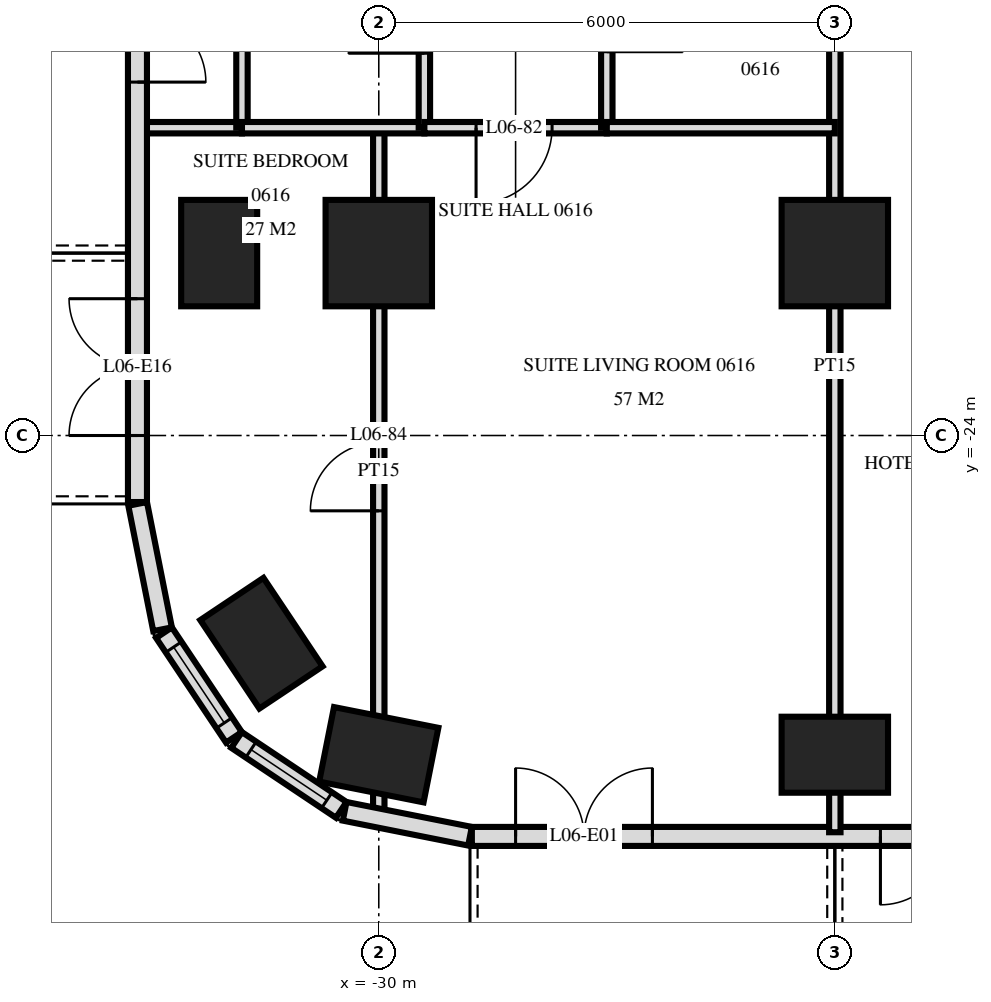
"""IFC4 building model, lengths in metres.
Left out: names, types, materials, properties, quantities, classifications, styles, units other than length and angle.
Written with IfcOpenShell. Run it as: python <this file> out.ifc"""

import sys

from ifc_helpers import new_model, si_unit, direction, frame, frame_2d, origin, origin_2d, place, context, subcontext, project, spatial, rectangle, extrude, element, fill, save


model = new_model("IFC4")
c1 = context("Model", 3, precision=1e-05, world=origin(), true_north=direction((0.0, 1.0)))
c2 = subcontext(c1, "Body", "Model", "MODEL_VIEW")
j1 = project(units=[si_unit("LENGTHUNIT", "METRE"), si_unit("PLANEANGLEUNIT", "RADIAN")], contexts=[c1])
p1 = place(None, origin())
s1 = spatial("IfcSite", under=j1, at=p1, CompositionType="ELEMENT")
p2 = place(p1, origin())
s2 = spatial("IfcBuilding", under=s1, at=p2, CompositionType="ELEMENT")
p3 = place(p2, frame((0.0, 0.0, 31.2)))
s3 = spatial("IfcBuildingStorey", under=s2, at=p3, CompositionType="ELEMENT", Elevation=31.2)
for number, where, z_axis, x_axis in (
    (1, (-32.1, -21.6, 0.0), (0.0, 0.0, 1.0), (0.0, 1.0, 0.0)),
    (2, (-31.544, -26.733, 0.0), (0.0, 0.0, 1.0), (-0.556, 0.831, 0.0)),
    (3, (-30.0, -28.2, 0.0), (0.0, 0.0, 1.0), (-0.981, 0.195, 0.0)),
):
    element("IfcColumn", number, at=place(p3, frame(where, z_axis=z_axis, x_axis=x_axis)), inside=s3, PredefinedType="COLUMN", context=c2, shape_type="SweptSolid", body=[
        extrude(rectangle(XDim=1.4, YDim=1.0, at=origin_2d()), origin(), (0.0, 0.0, 1.0), 3.6),
    ])
p4 = place(p3, frame((-30.0, -21.6, 0.0), z_axis=(0.0, 0.0, 1.0), x_axis=(1.0, 0.0, 0.0)))
e4 = element("IfcColumn", 4, at=p4, inside=s3, PredefinedType="COLUMN", context=c2, shape_type="SweptSolid", body=[
    extrude(rectangle(XDim=1.4, YDim=1.4, at=origin_2d()), origin(), (0.0, 0.0, 1.0), 3.6),
])
p5 = place(p3, frame((-24.0, -28.2, 0.0), z_axis=(0.0, 0.0, 1.0), x_axis=(1.0, 0.0, 0.0)))
e5 = element("IfcColumn", 5, at=p5, inside=s3, PredefinedType="COLUMN", context=c2, shape_type="SweptSolid", body=[
    extrude(rectangle(XDim=1.4, YDim=1.0, at=origin_2d()), origin(), (0.0, 0.0, 1.0), 3.6),
])
p6 = place(p3, frame((-24.0, -21.6, 0.0), z_axis=(0.0, 0.0, 1.0), x_axis=(1.0, 0.0, 0.0)))
e6 = element("IfcColumn", 6, at=p6, inside=s3, PredefinedType="COLUMN", context=c2, shape_type="SweptSolid", body=[
    extrude(rectangle(XDim=1.4, YDim=1.4, at=origin_2d()), origin(), (0.0, 0.0, 1.0), 3.6),
])
p7 = place(p3, frame((-33.175, -3.325, 0.0), z_axis=(0.0, 0.0, 1.0), x_axis=(0.0, -1.0, 0.0)))
e7 = element("IfcWall", 7, at=p7, inside=s3, PredefinedType="SOLIDWALL", context=c2, shape_type="SweptSolid", body=[
    extrude(rectangle(XDim=21.551, YDim=0.25, at=frame_2d((10.775, 0.0))), origin(), (0.0, 0.0, 1.0), 3.32),
])
p8 = place(p7, frame((7.025, 0.0, 0.0)))
e8 = element("IfcOpeningElement", 8, at=p8, cuts=e7, PredefinedType="OPENING", context=c2, shape_type="SweptSolid", body=[
    extrude(rectangle(XDim=1.8, YDim=2.4, at=frame_2d((0.9, 1.2))), frame((0.0, 0.135, 0.0), z_axis=(0.0, -1.0, 0.0), x_axis=(1.0, 0.0, 0.0)), (0.0, 0.0, 1.0), 0.27),
])
p9 = place(p7, frame((14.225, 0.0, 0.0)))
e9 = element("IfcOpeningElement", 9, at=p9, cuts=e7, PredefinedType="OPENING", context=c2, shape_type="SweptSolid", body=[
    extrude(rectangle(XDim=1.8, YDim=2.4, at=frame_2d((0.9, 1.2))), frame((0.0, 0.135, 0.0), z_axis=(0.0, -1.0, 0.0), x_axis=(1.0, 0.0, 0.0)), (0.0, 0.0, 1.0), 0.27),
])
p10 = place(p7, frame((18.875, 0.0, 0.0)))
e10 = element("IfcOpeningElement", 10, at=p10, cuts=e7, PredefinedType="OPENING", context=c2, shape_type="SweptSolid", body=[
    extrude(rectangle(XDim=1.8, YDim=2.4, at=frame_2d((0.9, 1.2))), frame((0.0, 0.135, 0.0), z_axis=(0.0, -1.0, 0.0), x_axis=(1.0, 0.0, 0.0)), (0.0, 0.0, 1.0), 0.27),
])
p11 = place(p3, frame((-33.173, -24.9, 0.0), z_axis=(0.0, 0.0, 1.0), x_axis=(0.195166572128, -0.980770110232, 0.0)))
e11 = element("IfcWall", 11, at=p11, inside=s3, PredefinedType="SOLIDWALL", context=c2, shape_type="SweptSolid", body=[
    extrude(rectangle(XDim=1.681, YDim=0.25, at=frame_2d((0.841, 0.0))), origin(), (0.0, 0.0, 1.0), 3.32),
])
p12 = place(p3, frame((-32.826, -26.594, 0.0), z_axis=(0.0, 0.0, 1.0), x_axis=(0.55555029066, -0.831482937015, 0.0)))
e12 = element("IfcWall", 12, at=p12, inside=s3, PredefinedType="SOLIDWALL", context=c2, shape_type="SweptSolid", body=[
    extrude(rectangle(XDim=1.656, YDim=0.25, at=frame_2d((0.828, 0.0))), origin(), (0.0, 0.0, 1.0), 3.32),
])
p13 = place(p12, frame((0.228, 0.0, 0.9)))
e13 = element("IfcOpeningElement", 13, at=p13, cuts=e12, PredefinedType="OPENING", context=c2, shape_type="SweptSolid", body=[
    extrude(rectangle(XDim=1.2, YDim=1.5, at=frame_2d((0.6, 0.75))), frame((0.0, 0.135, 0.0), z_axis=(0.0, -1.0, 0.0), x_axis=(1.0, 0.0, 0.0)), (0.0, 0.0, 1.0), 0.27),
])
p14 = place(p3, frame((-31.871, -28.006, 0.0), z_axis=(0.0, 0.0, 1.0), x_axis=(0.831482937015, -0.55555029066, 0.0)))
e14 = element("IfcWall", 14, at=p14, inside=s3, PredefinedType="SOLIDWALL", context=c2, shape_type="SweptSolid", body=[
    extrude(rectangle(XDim=1.656, YDim=0.25, at=frame_2d((0.828, 0.0))), origin(), (0.0, 0.0, 1.0), 3.32),
])
p15 = place(p14, frame((0.228, 0.0, 0.9)))
e15 = element("IfcOpeningElement", 15, at=p15, cuts=e14, PredefinedType="OPENING", context=c2, shape_type="SweptSolid", body=[
    extrude(rectangle(XDim=1.2, YDim=1.5, at=frame_2d((0.6, 0.75))), frame((0.0, 0.135, 0.0), z_axis=(0.0, -1.0, 0.0), x_axis=(1.0, 0.0, 0.0)), (0.0, 0.0, 1.0), 0.27),
])
p16 = place(p3, frame((-30.449, -28.945, 0.0), z_axis=(0.0, 0.0, 1.0), x_axis=(0.980775640221, -0.19513878023, 0.0)))
e16 = element("IfcWall", 16, at=p16, inside=s3, PredefinedType="SOLIDWALL", context=c2, shape_type="SweptSolid", body=[
    extrude(rectangle(XDim=1.681, YDim=0.25, at=frame_2d((0.841, 0.0))), origin(), (0.0, 0.0, 1.0), 3.32),
])
p17 = place(p3, frame((-28.775, -29.275, 0.0), z_axis=(0.0, 0.0, 1.0), x_axis=(1.0, 0.0, 0.0)))
e17 = element("IfcWall", 17, at=p17, inside=s3, PredefinedType="SOLIDWALL", context=c2, shape_type="SweptSolid", body=[
    extrude(rectangle(XDim=57.551, YDim=0.25, at=frame_2d((28.775, 0.0))), origin(), (0.0, 0.0, 1.0), 3.32),
])
p18 = place(p17, frame((0.575, 0.0, 0.0)))
e18 = element("IfcOpeningElement", 18, at=p18, cuts=e17, PredefinedType="OPENING", context=c2, shape_type="SweptSolid", body=[
    extrude(rectangle(XDim=1.8, YDim=2.4, at=frame_2d((0.9, 1.2))), frame((0.0, 0.135, 0.0), z_axis=(0.0, -1.0, 0.0), x_axis=(1.0, 0.0, 0.0)), (0.0, 0.0, 1.0), 0.27),
])
p19 = place(p17, frame((5.375, 0.0, 0.0)))
e19 = element("IfcOpeningElement", 19, at=p19, cuts=e17, PredefinedType="OPENING", context=c2, shape_type="SweptSolid", body=[
    extrude(rectangle(XDim=1.8, YDim=2.4, at=frame_2d((0.9, 1.2))), frame((0.0, 0.135, 0.0), z_axis=(0.0, -1.0, 0.0), x_axis=(1.0, 0.0, 0.0)), (0.0, 0.0, 1.0), 0.27),
])
p20 = place(p17, frame((8.075, 0.0, 0.3)))
e20 = element("IfcOpeningElement", 20, at=p20, cuts=e17, PredefinedType="OPENING", context=c2, shape_type="SweptSolid", body=[
    extrude(rectangle(XDim=2.4, YDim=2.1, at=frame_2d((1.2, 1.05))), frame((0.0, 0.135, 0.0), z_axis=(0.0, -1.0, 0.0), x_axis=(1.0, 0.0, 0.0)), (0.0, 0.0, 1.0), 0.27),
])
p21 = place(p17, frame((11.375, 0.0, 0.0)))
e21 = element("IfcOpeningElement", 21, at=p21, cuts=e17, PredefinedType="OPENING", context=c2, shape_type="SweptSolid", body=[
    extrude(rectangle(XDim=1.8, YDim=2.4, at=frame_2d((0.9, 1.2))), frame((0.0, 0.135, 0.0), z_axis=(0.0, -1.0, 0.0), x_axis=(1.0, 0.0, 0.0)), (0.0, 0.0, 1.0), 0.27),
])
p22 = place(p17, frame((14.075, 0.0, 0.3)))
e22 = element("IfcOpeningElement", 22, at=p22, cuts=e17, PredefinedType="OPENING", context=c2, shape_type="SweptSolid", body=[
    extrude(rectangle(XDim=2.4, YDim=2.1, at=frame_2d((1.2, 1.05))), frame((0.0, 0.135, 0.0), z_axis=(0.0, -1.0, 0.0), x_axis=(1.0, 0.0, 0.0)), (0.0, 0.0, 1.0), 0.27),
])
p23 = place(p17, frame((17.375, 0.0, 0.0)))
e23 = element("IfcOpeningElement", 23, at=p23, cuts=e17, PredefinedType="OPENING", context=c2, shape_type="SweptSolid", body=[
    extrude(rectangle(XDim=1.8, YDim=2.4, at=frame_2d((0.9, 1.2))), frame((0.0, 0.135, 0.0), z_axis=(0.0, -1.0, 0.0), x_axis=(1.0, 0.0, 0.0)), (0.0, 0.0, 1.0), 0.27),
])
p24 = place(p17, frame((20.075, 0.0, 0.3)))
e24 = element("IfcOpeningElement", 24, at=p24, cuts=e17, PredefinedType="OPENING", context=c2, shape_type="SweptSolid", body=[
    extrude(rectangle(XDim=2.4, YDim=2.1, at=frame_2d((1.2, 1.05))), frame((0.0, 0.135, 0.0), z_axis=(0.0, -1.0, 0.0), x_axis=(1.0, 0.0, 0.0)), (0.0, 0.0, 1.0), 0.27),
])
p25 = place(p17, frame((23.075, 0.0, 0.3)))
e25 = element("IfcOpeningElement", 25, at=p25, cuts=e17, PredefinedType="OPENING", context=c2, shape_type="SweptSolid", body=[
    extrude(rectangle(XDim=2.4, YDim=2.1, at=frame_2d((1.2, 1.05))), frame((0.0, 0.135, 0.0), z_axis=(0.0, -1.0, 0.0), x_axis=(1.0, 0.0, 0.0)), (0.0, 0.0, 1.0), 0.27),
])
p26 = place(p17, frame((26.375, 0.0, 0.0)))
e26 = element("IfcOpeningElement", 26, at=p26, cuts=e17, PredefinedType="OPENING", context=c2, shape_type="SweptSolid", body=[
    extrude(rectangle(XDim=1.8, YDim=2.4, at=frame_2d((0.9, 1.2))), frame((0.0, 0.135, 0.0), z_axis=(0.0, -1.0, 0.0), x_axis=(1.0, 0.0, 0.0)), (0.0, 0.0, 1.0), 0.27),
])
p27 = place(p17, frame((29.375, 0.0, 0.0)))
e27 = element("IfcOpeningElement", 27, at=p27, cuts=e17, PredefinedType="OPENING", context=c2, shape_type="SweptSolid", body=[
    extrude(rectangle(XDim=1.8, YDim=2.4, at=frame_2d((0.9, 1.2))), frame((0.0, 0.135, 0.0), z_axis=(0.0, -1.0, 0.0), x_axis=(1.0, 0.0, 0.0)), (0.0, 0.0, 1.0), 0.27),
])
p28 = place(p17, frame((32.075, 0.0, 0.3)))
e28 = element("IfcOpeningElement", 28, at=p28, cuts=e17, PredefinedType="OPENING", context=c2, shape_type="SweptSolid", body=[
    extrude(rectangle(XDim=2.4, YDim=2.1, at=frame_2d((1.2, 1.05))), frame((0.0, 0.135, 0.0), z_axis=(0.0, -1.0, 0.0), x_axis=(1.0, 0.0, 0.0)), (0.0, 0.0, 1.0), 0.27),
])
p29 = place(p17, frame((35.375, 0.0, 0.0)))
e29 = element("IfcOpeningElement", 29, at=p29, cuts=e17, PredefinedType="OPENING", context=c2, shape_type="SweptSolid", body=[
    extrude(rectangle(XDim=1.8, YDim=2.4, at=frame_2d((0.9, 1.2))), frame((0.0, 0.135, 0.0), z_axis=(0.0, -1.0, 0.0), x_axis=(1.0, 0.0, 0.0)), (0.0, 0.0, 1.0), 0.27),
])
p30 = place(p17, frame((38.075, 0.0, 0.3)))
e30 = element("IfcOpeningElement", 30, at=p30, cuts=e17, PredefinedType="OPENING", context=c2, shape_type="SweptSolid", body=[
    extrude(rectangle(XDim=2.4, YDim=2.1, at=frame_2d((1.2, 1.05))), frame((0.0, 0.135, 0.0), z_axis=(0.0, -1.0, 0.0), x_axis=(1.0, 0.0, 0.0)), (0.0, 0.0, 1.0), 0.27),
])
p31 = place(p17, frame((41.375, 0.0, 0.0)))
e31 = element("IfcOpeningElement", 31, at=p31, cuts=e17, PredefinedType="OPENING", context=c2, shape_type="SweptSolid", body=[
    extrude(rectangle(XDim=1.8, YDim=2.4, at=frame_2d((0.9, 1.2))), frame((0.0, 0.135, 0.0), z_axis=(0.0, -1.0, 0.0), x_axis=(1.0, 0.0, 0.0)), (0.0, 0.0, 1.0), 0.27),
])
p32 = place(p17, frame((44.075, 0.0, 0.3)))
e32 = element("IfcOpeningElement", 32, at=p32, cuts=e17, PredefinedType="OPENING", context=c2, shape_type="SweptSolid", body=[
    extrude(rectangle(XDim=2.4, YDim=2.1, at=frame_2d((1.2, 1.05))), frame((0.0, 0.135, 0.0), z_axis=(0.0, -1.0, 0.0), x_axis=(1.0, 0.0, 0.0)), (0.0, 0.0, 1.0), 0.27),
])
p33 = place(p17, frame((47.075, 0.0, 0.3)))
e33 = element("IfcOpeningElement", 33, at=p33, cuts=e17, PredefinedType="OPENING", context=c2, shape_type="SweptSolid", body=[
    extrude(rectangle(XDim=2.4, YDim=2.1, at=frame_2d((1.2, 1.05))), frame((0.0, 0.135, 0.0), z_axis=(0.0, -1.0, 0.0), x_axis=(1.0, 0.0, 0.0)), (0.0, 0.0, 1.0), 0.27),
])
p34 = place(p17, frame((50.375, 0.0, 0.0)))
e34 = element("IfcOpeningElement", 34, at=p34, cuts=e17, PredefinedType="OPENING", context=c2, shape_type="SweptSolid", body=[
    extrude(rectangle(XDim=1.8, YDim=2.4, at=frame_2d((0.9, 1.2))), frame((0.0, 0.135, 0.0), z_axis=(0.0, -1.0, 0.0), x_axis=(1.0, 0.0, 0.0)), (0.0, 0.0, 1.0), 0.27),
])
p35 = place(p17, frame((53.375, 0.0, 0.0)))
e35 = element("IfcOpeningElement", 35, at=p35, cuts=e17, PredefinedType="OPENING", context=c2, shape_type="SweptSolid", body=[
    extrude(rectangle(XDim=1.8, YDim=2.4, at=frame_2d((0.9, 1.2))), frame((0.0, 0.135, 0.0), z_axis=(0.0, -1.0, 0.0), x_axis=(1.0, 0.0, 0.0)), (0.0, 0.0, 1.0), 0.27),
])
p36 = place(p3, frame((-24.0, -29.22, 0.0), z_axis=(0.0, 0.0, 1.0), x_axis=(0.0, 1.0, 0.0)))
e36 = element("IfcWall", 36, at=p36, inside=s3, PredefinedType="PARTITIONING", context=c2, shape_type="SweptSolid", body=[
    extrude(rectangle(XDim=12.27, YDim=0.15, at=frame_2d((6.135, 0.0))), origin(), (0.0, 0.0, 1.0), 3.32),
])
p37 = place(p3, frame((-27.0, -19.95, 0.0), z_axis=(0.0, 0.0, 1.0), x_axis=(0.0, 1.0, 0.0)))
e37 = element("IfcWall", 37, at=p37, inside=s3, PredefinedType="PARTITIONING", context=c2, shape_type="SweptSolid", body=[
    extrude(rectangle(XDim=3.0, YDim=0.15, at=frame_2d((1.5, 0.0))), origin(), (0.0, 0.0, 1.0), 3.32),
])
p38 = place(p37, frame((1.0, 0.0, 0.0)))
e38 = element("IfcOpeningElement", 38, at=p38, cuts=e37, PredefinedType="OPENING", context=c2, shape_type="SweptSolid", body=[
    extrude(rectangle(XDim=1.0, YDim=2.1, at=frame_2d((0.5, 1.05))), frame((0.0, 0.085, 0.0), z_axis=(0.0, -1.0, 0.0), x_axis=(1.0, 0.0, 0.0)), (0.0, 0.0, 1.0), 0.17),
])
p39 = place(p3, frame((-29.4, -19.95, 0.0), z_axis=(0.0, 0.0, 1.0), x_axis=(0.0, 1.0, 0.0)))
e39 = element("IfcWall", 39, at=p39, inside=s3, PredefinedType="PARTITIONING", context=c2, shape_type="SweptSolid", body=[
    extrude(rectangle(XDim=3.0, YDim=0.15, at=frame_2d((1.5, 0.0))), origin(), (0.0, 0.0, 1.0), 3.32),
])
p40 = place(p39, frame((0.98, 0.0, 0.0)))
e40 = element("IfcOpeningElement", 40, at=p40, cuts=e39, PredefinedType="OPENING", context=c2, shape_type="SweptSolid", body=[
    extrude(rectangle(XDim=1.0, YDim=2.1, at=frame_2d((0.5, 1.05))), frame((0.0, 0.085, 0.0), z_axis=(0.0, -1.0, 0.0), x_axis=(1.0, 0.0, 0.0)), (0.0, 0.0, 1.0), 0.17),
])
p41 = place(p3, frame((-30.0, -28.978, 0.0), z_axis=(0.0, 0.0, 1.0), x_axis=(0.0, 1.0, 0.0)))
e41 = element("IfcWall", 41, at=p41, inside=s3, PredefinedType="PARTITIONING", context=c2, shape_type="SweptSolid", body=[
    extrude(rectangle(XDim=9.028, YDim=0.15, at=frame_2d((4.514, 0.0))), origin(), (0.0, 0.0, 1.0), 3.32),
])
p42 = place(p41, frame((3.987, 0.0, 0.0)))
e42 = element("IfcOpeningElement", 42, at=p42, cuts=e41, PredefinedType="OPENING", context=c2, shape_type="SweptSolid", body=[
    extrude(rectangle(XDim=0.9, YDim=2.1, at=frame_2d((0.45, 1.05))), frame((0.0, 0.085, 0.0), z_axis=(0.0, -1.0, 0.0), x_axis=(1.0, 0.0, 0.0)), (0.0, 0.0, 1.0), 0.17),
])
p43 = place(p3, frame((-31.8, -19.95, 0.0), z_axis=(0.0, 0.0, 1.0), x_axis=(0.0, 1.0, 0.0)))
e43 = element("IfcWall", 43, at=p43, inside=s3, PredefinedType="PLUMBINGWALL", context=c2, shape_type="SweptSolid", body=[
    extrude(rectangle(XDim=3.0, YDim=0.15, at=frame_2d((1.5, 0.0))), origin(), (0.0, 0.0, 1.0), 3.32),
])
p44 = place(p43, frame((1.08, 0.0, 0.0)))
e44 = element("IfcOpeningElement", 44, at=p44, cuts=e43, PredefinedType="OPENING", context=c2, shape_type="SweptSolid", body=[
    extrude(rectangle(XDim=0.8, YDim=2.1, at=frame_2d((0.4, 1.05))), frame((0.0, 0.085, 0.0), z_axis=(0.0, -1.0, 0.0), x_axis=(1.0, 0.0, 0.0)), (0.0, 0.0, 1.0), 0.17),
])
p45 = place(p3, frame((-29.4, -19.95, 0.0), z_axis=(0.0, 0.0, 1.0), x_axis=(1.0, 0.0, 0.0)))
e45 = element("IfcWall", 45, at=p45, inside=s3, PredefinedType="PARTITIONING", context=c2, shape_type="SweptSolid", body=[
    extrude(rectangle(XDim=2.4, YDim=0.15, at=frame_2d((1.2, 0.0))), origin(), (0.0, 0.0, 1.0), 3.32),
])
p46 = place(p45, frame((0.68, 0.0, 0.0)))
e46 = element("IfcOpeningElement", 46, at=p46, cuts=e45, PredefinedType="OPENING", context=c2, shape_type="SweptSolid", body=[
    extrude(rectangle(XDim=1.0, YDim=2.1, at=frame_2d((0.5, 1.05))), frame((0.0, 0.085, 0.0), z_axis=(0.0, -1.0, 0.0), x_axis=(1.0, 0.0, 0.0)), (0.0, 0.0, 1.0), 0.17),
])
p47 = place(p3, frame((-31.8, -19.95, 0.0), z_axis=(0.0, 0.0, 1.0), x_axis=(1.0, 0.0, 0.0)))
e47 = element("IfcWall", 47, at=p47, inside=s3, PredefinedType="PARTITIONING", context=c2, shape_type="SweptSolid", body=[
    extrude(rectangle(XDim=2.4, YDim=0.15, at=frame_2d((1.2, 0.0))), origin(), (0.0, 0.0, 1.0), 3.32),
])
p48 = place(p3, frame((-27.0, -19.95, 0.0), z_axis=(0.0, 0.0, 1.0), x_axis=(1.0, 0.0, 0.0)))
e48 = element("IfcWall", 48, at=p48, inside=s3, PredefinedType="PARTITIONING", context=c2, shape_type="SweptSolid", body=[
    extrude(rectangle(XDim=3.0, YDim=0.15, at=frame_2d((1.5, 0.0))), origin(), (0.0, 0.0, 1.0), 3.32),
])
p49 = place(p3, frame((-33.12, -19.95, 0.0), z_axis=(0.0, 0.0, 1.0), x_axis=(1.0, 0.0, 0.0)))
e49 = element("IfcWall", 49, at=p49, inside=s3, PredefinedType="PLUMBINGWALL", context=c2, shape_type="SweptSolid", body=[
    extrude(rectangle(XDim=1.32, YDim=0.15, at=frame_2d((0.66, 0.0))), origin(), (0.0, 0.0, 1.0), 3.32),
])
p50 = place(p13, origin())
e50 = element("IfcWindow", 50, at=p50, inside=s3, PartitioningType="SINGLE_PANEL", PredefinedType="WINDOW", context=c2, shape_type="SweptSolid", body=[
    extrude(rectangle(XDim=1.2, YDim=1.5, at=frame_2d((0.6, 0.75))), frame((0.0, 0.03, 0.0), z_axis=(0.0, -1.0, 0.0), x_axis=(1.0, 0.0, 0.0)), (0.0, 0.0, 1.0), 0.06),
])
fill(e13, e50)
p51 = place(p15, origin())
e51 = element("IfcWindow", 51, at=p51, inside=s3, PartitioningType="SINGLE_PANEL", PredefinedType="WINDOW", context=c2, shape_type="SweptSolid", body=[
    extrude(rectangle(XDim=1.2, YDim=1.5, at=frame_2d((0.6, 0.75))), frame((0.0, 0.03, 0.0), z_axis=(0.0, -1.0, 0.0), x_axis=(1.0, 0.0, 0.0)), (0.0, 0.0, 1.0), 0.06),
])
fill(e15, e51)
p52 = place(p18, origin())
e52 = element("IfcDoor", 52, at=p52, inside=s3, OperationType="DOUBLE_DOOR_SINGLE_SWING", PredefinedType="DOOR", context=c2, shape_type="SweptSolid", body=[
    extrude(rectangle(XDim=1.8, YDim=2.4, at=frame_2d((0.9, 1.2))), frame((0.0, 0.025, 0.0), z_axis=(0.0, -1.0, 0.0), x_axis=(1.0, 0.0, 0.0)), (0.0, 0.0, 1.0), 0.05),
])
fill(e18, e52)
p53 = place(p19, frame((0.9, 0.0, 0.0), z_axis=(0.0, 0.0, 1.0), x_axis=(-1.0, 0.0, 0.0)))
e53 = element("IfcDoor", 53, at=p53, inside=s3, OperationType="DOUBLE_DOOR_SINGLE_SWING", PredefinedType="DOOR", context=c2, shape_type="SweptSolid", body=[
    extrude(rectangle(XDim=1.8, YDim=2.4, at=frame_2d((0.0, 1.2))), frame((0.0, -0.025, 0.0), z_axis=(0.0, 1.0, 0.0), x_axis=(-1.0, 0.0, 0.0)), (0.0, 0.0, 1.0), 0.05),
])
fill(e19, e53)
p54 = place(p9, origin())
e54 = element("IfcDoor", 54, at=p54, inside=s3, OperationType="DOUBLE_DOOR_SINGLE_SWING", PredefinedType="DOOR", context=c2, shape_type="SweptSolid", body=[
    extrude(rectangle(XDim=1.8, YDim=2.4, at=frame_2d((0.9, 1.2))), frame((0.0, 0.025, 0.0), z_axis=(0.0, -1.0, 0.0), x_axis=(1.0, 0.0, 0.0)), (0.0, 0.0, 1.0), 0.05),
])
fill(e9, e54)
p55 = place(p10, frame((0.9, 0.0, 0.0), z_axis=(0.0, 0.0, 1.0), x_axis=(-1.0, 0.0, 0.0)))
e55 = element("IfcDoor", 55, at=p55, inside=s3, OperationType="DOUBLE_DOOR_SINGLE_SWING", PredefinedType="DOOR", context=c2, shape_type="SweptSolid", body=[
    extrude(rectangle(XDim=1.8, YDim=2.4, at=frame_2d((0.0, 1.2))), frame((0.0, -0.025, 0.0), z_axis=(0.0, 1.0, 0.0), x_axis=(-1.0, 0.0, 0.0)), (0.0, 0.0, 1.0), 0.05),
])
fill(e10, e55)
p56 = place(p40, origin())
e56 = element("IfcDoor", 56, at=p56, inside=s3, OperationType="SINGLE_SWING_RIGHT", PredefinedType="DOOR", context=c2, shape_type="SweptSolid", body=[
    extrude(rectangle(XDim=1.0, YDim=2.1, at=frame_2d((0.5, 1.05))), frame((0.0, 0.025, 0.0), z_axis=(0.0, -1.0, 0.0), x_axis=(1.0, 0.0, 0.0)), (0.0, 0.0, 1.0), 0.05),
])
fill(e40, e56)
p57 = place(p46, frame((0.5, 0.0, 0.0), z_axis=(0.0, 0.0, 1.0), x_axis=(-1.0, 0.0, 0.0)))
e57 = element("IfcDoor", 57, at=p57, inside=s3, OperationType="SINGLE_SWING_LEFT", PredefinedType="DOOR", context=c2, shape_type="SweptSolid", body=[
    extrude(rectangle(XDim=1.0, YDim=2.1, at=frame_2d((0.0, 1.05))), frame((0.0, -0.025, 0.0), z_axis=(0.0, 1.0, 0.0), x_axis=(-1.0, 0.0, 0.0)), (0.0, 0.0, 1.0), 0.05),
])
fill(e46, e57)
p58 = place(p42, origin())
e58 = element("IfcDoor", 58, at=p58, inside=s3, OperationType="SINGLE_SWING_RIGHT", PredefinedType="DOOR", context=c2, shape_type="SweptSolid", body=[
    extrude(rectangle(XDim=0.9, YDim=2.1, at=frame_2d((0.45, 1.05))), frame((0.0, 0.025, 0.0), z_axis=(0.0, -1.0, 0.0), x_axis=(1.0, 0.0, 0.0)), (0.0, 0.0, 1.0), 0.05),
])
fill(e42, e58)
save(model, sys.argv[1])
